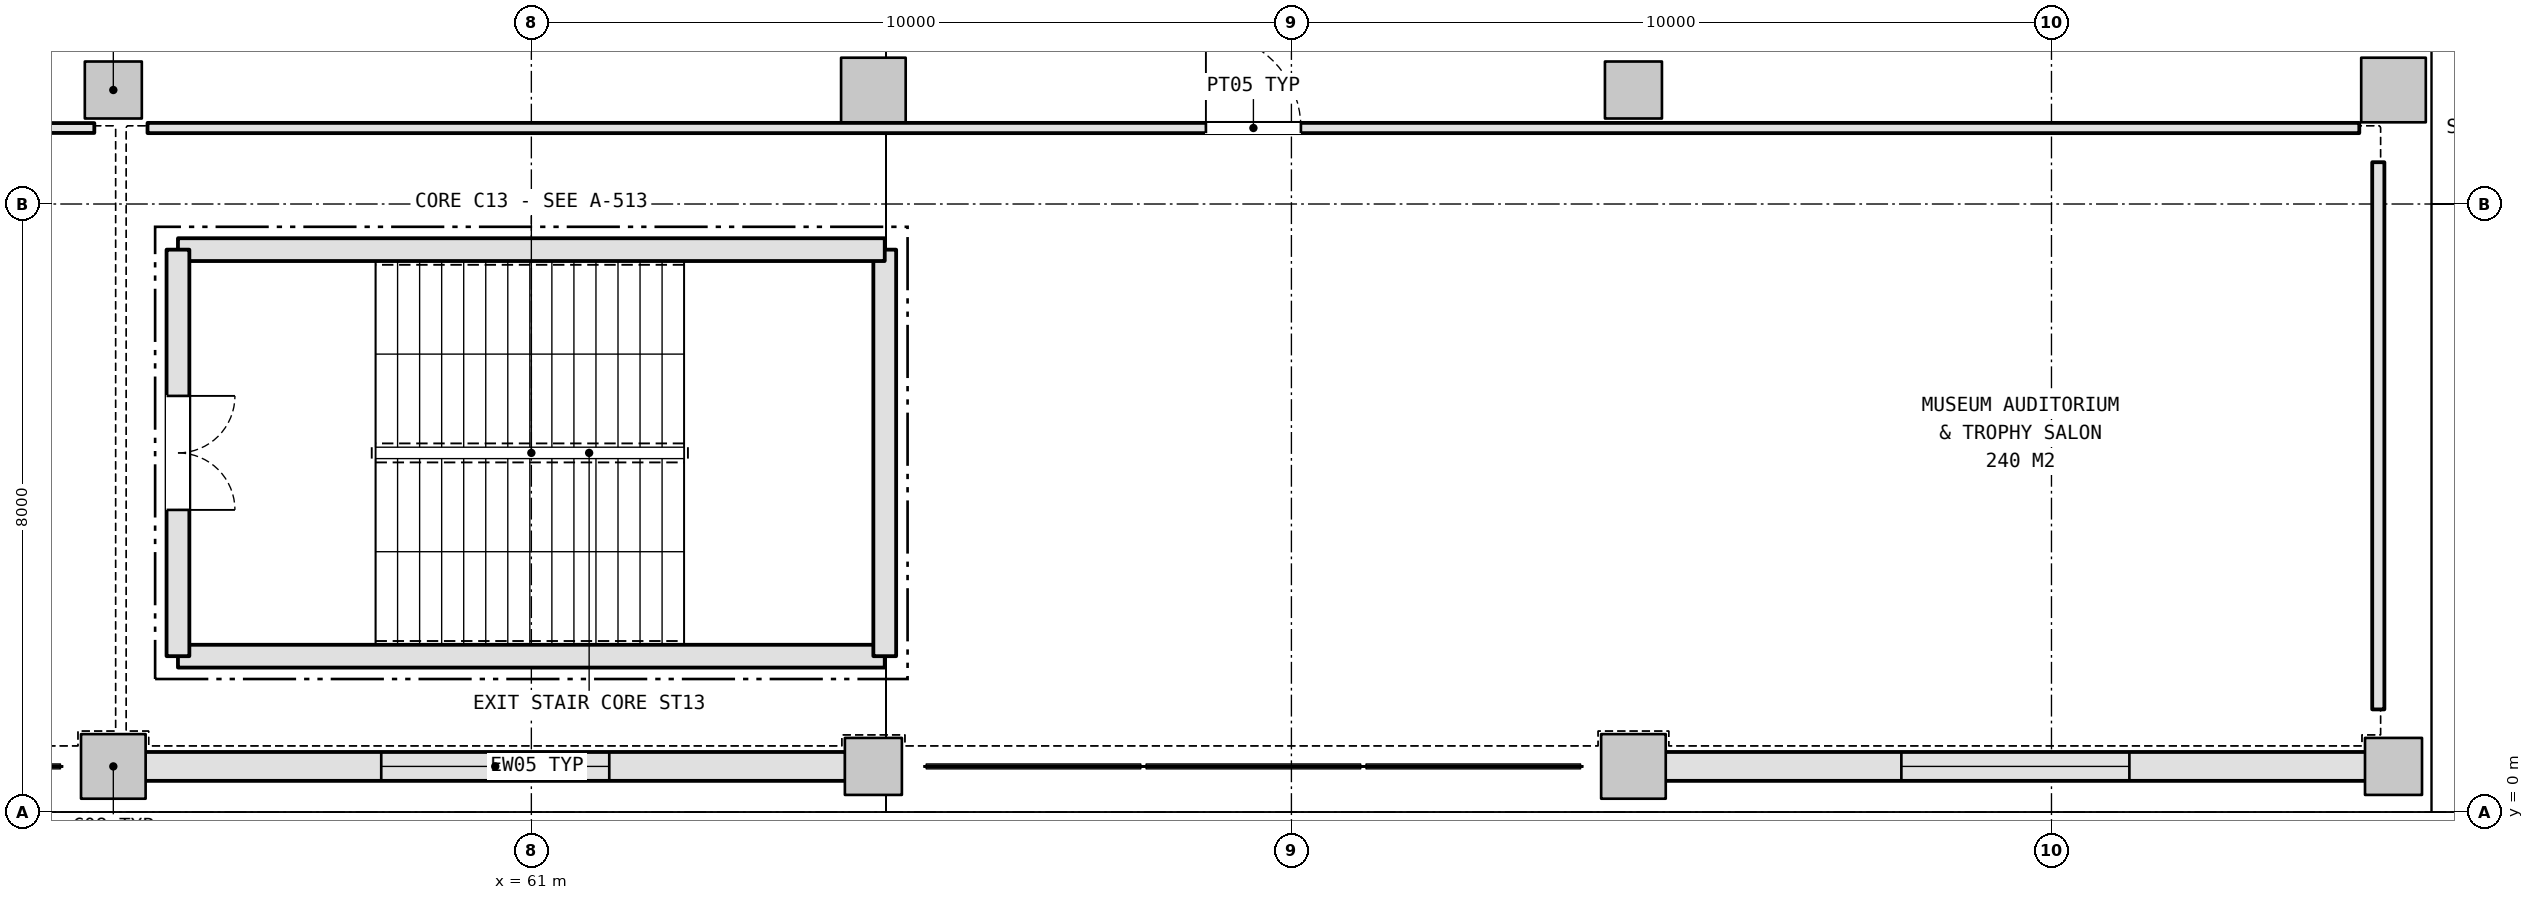
"""IFC4 building model, lengths in metres.
Left out: names, types, materials, properties, quantities, classifications, styles, units other than length and angle.
Written with IfcOpenShell. Run it as: python <this file> out.ifc"""

import sys

from ifc_helpers import new_model, si_unit, direction, frame, frame_2d, origin, origin_2d, place, context, subcontext, project, spatial, rectangle, extrude, element, fill, save


model = new_model("IFC4")
c1 = context("Model", 3, precision=1e-05, world=origin(), true_north=direction((0.0, 1.0)))
c2 = subcontext(c1, "Body", "Model", "MODEL_VIEW")
j1 = project(units=[si_unit("LENGTHUNIT", "METRE"), si_unit("PLANEANGLEUNIT", "RADIAN")], contexts=[c1])
p1 = place(None, origin())
s1 = spatial("IfcSite", under=j1, at=p1, CompositionType="ELEMENT")
p2 = place(p1, origin())
s2 = spatial("IfcBuilding", under=s1, at=p2, CompositionType="ELEMENT")
p3 = place(p2, frame((0.0, 0.0, 5.4)))
s3 = spatial("IfcBuildingStorey", under=s2, at=p3, CompositionType="ELEMENT", Elevation=5.4)
p4 = place(p3, frame((55.5, 0.6, 0.0), z_axis=(0.0, 0.0, 1.0), x_axis=(1.0, 0.0, 0.0)))
e1 = element("IfcColumn", 1, at=p4, inside=s3, PredefinedType="COLUMN", context=c2, shape_type="SweptSolid", body=[
    extrude(rectangle(XDim=0.85, YDim=0.85, at=origin_2d()), origin(), (0.0, 0.0, 1.0), 5.4),
])
for number, where, z_axis, x_axis in (
    (2, (55.5, 9.5, 0.0), (0.0, 0.0, 1.0), (1.0, 0.0, 0.0)),
    (3, (65.5, 0.6, 0.0), (0.0, 0.0, 1.0), (1.0, 0.0, 0.0)),
):
    element("IfcColumn", number, at=place(p3, frame(where, z_axis=z_axis, x_axis=x_axis)), inside=s3, PredefinedType="COLUMN", context=c2, shape_type="SweptSolid", body=[
        extrude(rectangle(XDim=0.75, YDim=0.75, at=origin_2d()), origin(), (0.0, 0.0, 1.0), 5.4),
    ])
for number, where, z_axis, x_axis in (
    (4, (65.5, 9.5, 0.0), (0.0, 0.0, 1.0), (1.0, 0.0, 0.0)),
    (5, (75.5, 0.6, 0.0), (0.0, 0.0, 1.0), (1.0, 0.0, 0.0)),
):
    element("IfcColumn", number, at=place(p3, frame(where, z_axis=z_axis, x_axis=x_axis)), inside=s3, PredefinedType="COLUMN", context=c2, shape_type="SweptSolid", body=[
        extrude(rectangle(XDim=0.85, YDim=0.85, at=origin_2d()), origin(), (0.0, 0.0, 1.0), 5.4),
    ])
for number, where, z_axis, x_axis in (
    (6, (75.5, 9.5, 0.0), (0.0, 0.0, 1.0), (1.0, 0.0, 0.0)),
    (7, (85.5, 0.6, 0.0), (0.0, 0.0, 1.0), (1.0, 0.0, 0.0)),
):
    element("IfcColumn", number, at=place(p3, frame(where, z_axis=z_axis, x_axis=x_axis)), inside=s3, PredefinedType="COLUMN", context=c2, shape_type="SweptSolid", body=[
        extrude(rectangle(XDim=0.75, YDim=0.75, at=origin_2d()), origin(), (0.0, 0.0, 1.0), 5.4),
    ])
p5 = place(p3, frame((85.5, 9.5, 0.0), z_axis=(0.0, 0.0, 1.0), x_axis=(1.0, 0.0, 0.0)))
e8 = element("IfcColumn", 8, at=p5, inside=s3, PredefinedType="COLUMN", context=c2, shape_type="SweptSolid", body=[
    extrude(rectangle(XDim=0.85, YDim=0.85, at=origin_2d()), origin(), (0.0, 0.0, 1.0), 5.4),
])
p6 = place(p3, frame((55.913, 0.6, 0.0), z_axis=(0.0, 0.0, 1.0), x_axis=(1.0, 0.0, 0.0)))
e9 = element("IfcWall", 9, at=p6, inside=s3, PredefinedType="SOLIDWALL", context=c2, shape_type="SweptSolid", body=[
    extrude(rectangle(XDim=9.224, YDim=0.38, at=frame_2d((4.612, 0.0))), origin(), (0.0, 0.0, 1.0), 4.425),
])
p7 = place(p6, frame((3.112, 0.0, 1.05)))
e10 = element("IfcOpeningElement", 10, at=p7, cuts=e9, PredefinedType="OPENING", context=c2, shape_type="SweptSolid", body=[
    extrude(rectangle(XDim=3.0, YDim=2.4, at=frame_2d((1.5, 1.2))), frame((0.0, 0.2, 0.0), z_axis=(0.0, -1.0, 0.0), x_axis=(1.0, 0.0, 0.0)), (0.0, 0.0, 1.0), 0.4),
])
p8 = place(p3, frame((75.913, 0.6, 0.0), z_axis=(0.0, 0.0, 1.0), x_axis=(1.0, 0.0, 0.0)))
e11 = element("IfcWall", 11, at=p8, inside=s3, PredefinedType="SOLIDWALL", context=c2, shape_type="SweptSolid", body=[
    extrude(rectangle(XDim=9.224, YDim=0.38, at=frame_2d((4.612, 0.0))), origin(), (0.0, 0.0, 1.0), 4.425),
])
p9 = place(p8, frame((3.112, 0.0, 1.05)))
e12 = element("IfcOpeningElement", 12, at=p9, cuts=e11, PredefinedType="OPENING", context=c2, shape_type="SweptSolid", body=[
    extrude(rectangle(XDim=3.0, YDim=2.4, at=frame_2d((1.5, 1.2))), frame((0.0, 0.2, 0.0), z_axis=(0.0, -1.0, 0.0), x_axis=(1.0, 0.0, 0.0)), (0.0, 0.0, 1.0), 0.4),
])
p10 = place(p3, frame((56.35, 2.05, 0.0), z_axis=(0.0, 0.0, 1.0), x_axis=(1.0, 0.0, 0.0)))
e13 = element("IfcWall", 13, at=p10, inside=s3, PredefinedType="SHEAR", context=c2, shape_type="SweptSolid", body=[
    extrude(rectangle(XDim=9.299, YDim=0.3, at=frame_2d((4.65, 0.0))), origin(), (0.0, 0.0, 1.0), 5.14),
])
p11 = place(p3, frame((65.65, 2.05, 0.0), z_axis=(0.0, 0.0, 1.0), x_axis=(0.0, 1.0, 0.0)))
e14 = element("IfcWall", 14, at=p11, inside=s3, PredefinedType="SHEAR", context=c2, shape_type="SweptSolid", body=[
    extrude(rectangle(XDim=5.349, YDim=0.3, at=frame_2d((2.675, 0.0))), origin(), (0.0, 0.0, 1.0), 5.14),
])
p12 = place(p3, frame((65.65, 7.4, 0.0), z_axis=(0.0, 0.0, 1.0), x_axis=(-1.0, 0.0, 0.0)))
e15 = element("IfcWall", 15, at=p12, inside=s3, PredefinedType="SHEAR", context=c2, shape_type="SweptSolid", body=[
    extrude(rectangle(XDim=9.299, YDim=0.3, at=frame_2d((4.65, 0.0))), origin(), (0.0, 0.0, 1.0), 5.14),
])
p13 = place(p3, frame((56.35, 7.4, 0.0), z_axis=(0.0, 0.0, 1.0), x_axis=(0.0, -1.0, 0.0)))
e16 = element("IfcWall", 16, at=p13, inside=s3, PredefinedType="SHEAR", context=c2, shape_type="SweptSolid", body=[
    extrude(rectangle(XDim=5.349, YDim=0.3, at=frame_2d((2.675, 0.0))), origin(), (0.0, 0.0, 1.0), 5.14),
])
p14 = place(p13, frame((1.925, 0.0, 0.0)))
e17 = element("IfcOpeningElement", 17, at=p14, cuts=e16, PredefinedType="OPENING", context=c2, shape_type="SweptSolid", body=[
    extrude(rectangle(XDim=1.5, YDim=2.2, at=frame_2d((0.75, 1.1))), frame((0.0, 0.16, 0.0), z_axis=(0.0, -1.0, 0.0), x_axis=(1.0, 0.0, 0.0)), (0.0, 0.0, 1.0), 0.32),
])
p15 = place(p3, frame((25.95, 9.0, 0.0), z_axis=(0.0, 0.0, 1.0), x_axis=(1.0, 0.0, 0.0)))
e18 = element("IfcWall", 18, at=p15, inside=s3, PredefinedType="PARTITIONING", context=c2, shape_type="SweptSolid", body=[
    extrude(rectangle(XDim=29.3, YDim=0.13, at=frame_2d((14.65, 0.0))), origin(), (0.0, 0.0, 1.0), 4.425),
])
p16 = place(p15, frame((14.2, 0.0, 0.0)))
e19 = element("IfcOpeningElement", 19, at=p16, cuts=e18, PredefinedType="OPENING", context=c2, shape_type="SweptSolid", body=[
    extrude(rectangle(XDim=0.9, YDim=2.1, at=frame_2d((0.45, 1.05))), frame((0.0, 0.075, 0.0), z_axis=(0.0, -1.0, 0.0), x_axis=(1.0, 0.0, 0.0)), (0.0, 0.0, 1.0), 0.15),
])
p17 = place(p3, frame((55.95, 9.0, 0.0), z_axis=(0.0, 0.0, 1.0), x_axis=(1.0, 0.0, 0.0)))
e20 = element("IfcWall", 20, at=p17, inside=s3, PredefinedType="PARTITIONING", context=c2, shape_type="SweptSolid", body=[
    extrude(rectangle(XDim=29.1, YDim=0.135, at=frame_2d((14.55, 0.0))), origin(), (0.0, 0.0, 1.0), 4.425),
])
p18 = place(p17, frame((13.925, 0.0, 0.0)))
e21 = element("IfcOpeningElement", 21, at=p18, cuts=e20, PredefinedType="OPENING", context=c2, shape_type="SweptSolid", body=[
    extrude(rectangle(XDim=1.25, YDim=2.2, at=frame_2d((0.625, 1.1))), frame((0.0, 0.077, 0.0), z_axis=(0.0, -1.0, 0.0), x_axis=(1.0, 0.0, 0.0)), (0.0, 0.0, 1.0), 0.155),
])
p19 = place(p3, frame((85.3, 8.55, 0.0), z_axis=(0.0, 0.0, 1.0), x_axis=(0.0, -1.0, 0.0)))
e22 = element("IfcWall", 22, at=p19, inside=s3, PredefinedType="PARTITIONING", context=c2, shape_type="SweptSolid", body=[
    extrude(rectangle(XDim=7.2, YDim=0.16, at=frame_2d((3.6, 0.0))), origin(), (0.0, 0.0, 1.0), 4.475),
])
p20 = place(p7, origin())
e23 = element("IfcWindow", 23, at=p20, inside=s3, PartitioningType="SINGLE_PANEL", PredefinedType="WINDOW", context=c2, shape_type="SweptSolid", body=[
    extrude(rectangle(XDim=3.0, YDim=2.4, at=frame_2d((1.5, 1.2))), frame((0.0, 0.03, 0.0), z_axis=(0.0, -1.0, 0.0), x_axis=(1.0, 0.0, 0.0)), (0.0, 0.0, 1.0), 0.06),
])
fill(e10, e23)
p21 = place(p9, origin())
e24 = element("IfcWindow", 24, at=p21, inside=s3, PartitioningType="SINGLE_PANEL", PredefinedType="WINDOW", context=c2, shape_type="SweptSolid", body=[
    extrude(rectangle(XDim=3.0, YDim=2.4, at=frame_2d((1.5, 1.2))), frame((0.0, 0.03, 0.0), z_axis=(0.0, -1.0, 0.0), x_axis=(1.0, 0.0, 0.0)), (0.0, 0.0, 1.0), 0.06),
])
fill(e12, e24)
p22 = place(p14, origin())
e25 = element("IfcDoor", 25, at=p22, inside=s3, OperationType="DOUBLE_DOOR_SINGLE_SWING", PredefinedType="DOOR", context=c2, shape_type="SweptSolid", body=[
    extrude(rectangle(XDim=1.5, YDim=2.2, at=frame_2d((0.75, 1.1))), frame((0.0, 0.025, 0.0), z_axis=(0.0, -1.0, 0.0), x_axis=(1.0, 0.0, 0.0)), (0.0, 0.0, 1.0), 0.05),
])
fill(e17, e25)
p23 = place(p18, origin())
e26 = element("IfcDoor", 26, at=p23, inside=s3, OperationType="SINGLE_SWING_LEFT", PredefinedType="DOOR", context=c2, shape_type="SweptSolid", body=[
    extrude(rectangle(XDim=1.25, YDim=2.2, at=frame_2d((0.625, 1.1))), frame((0.0, 0.025, 0.0), z_axis=(0.0, -1.0, 0.0), x_axis=(1.0, 0.0, 0.0)), (0.0, 0.0, 1.0), 0.05),
])
fill(e21, e26)
save(model, sys.argv[1])
